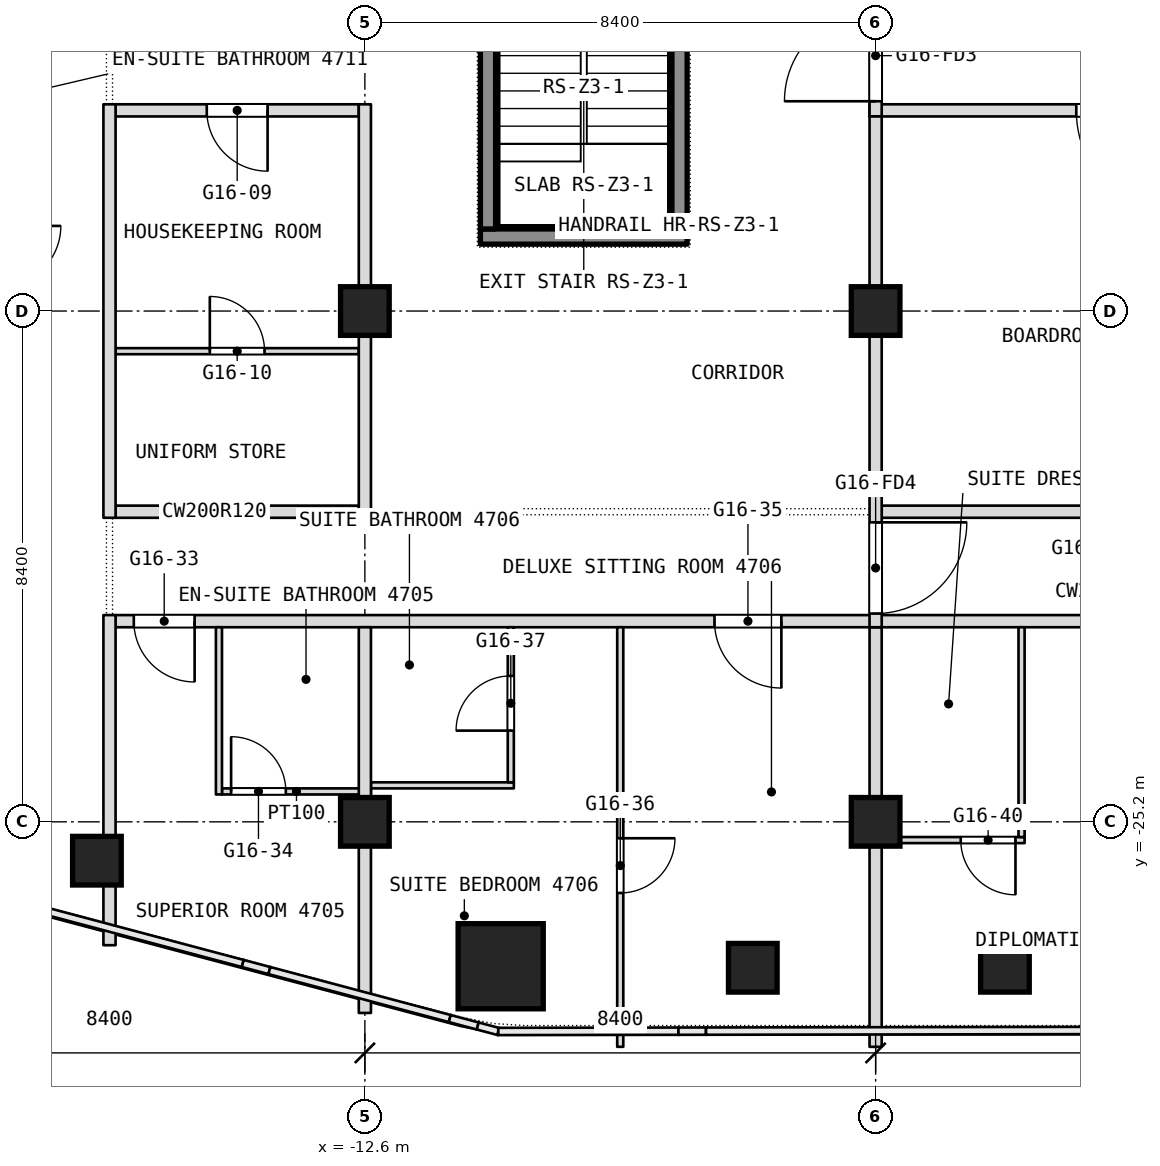
"""IFC4 building model, lengths in metres.
Left out: names, types, materials, properties, quantities, classifications, styles, units other than length and angle.
Written with IfcOpenShell. Run it as: python <this file> out.ifc"""

import sys

from ifc_helpers import new_model, si_unit, direction, frame, frame_2d, origin, origin_2d, place, context, subcontext, project, spatial, rectangle, extrude, element, fill, save


model = new_model("IFC4")
c1 = context("Model", 3, precision=1e-05, world=origin(), true_north=direction((0.0, 1.0)))
c2 = subcontext(c1, "Body", "Model", "MODEL_VIEW")
j1 = project(units=[si_unit("LENGTHUNIT", "METRE"), si_unit("PLANEANGLEUNIT", "RADIAN")], contexts=[c1])
p1 = place(None, origin())
s1 = spatial("IfcSite", under=j1, at=p1, CompositionType="ELEMENT")
p2 = place(p1, origin())
s2 = spatial("IfcBuilding", under=s1, at=p2, CompositionType="ELEMENT")
p3 = place(p2, frame((0.0, 0.0, 205.7)))
s3 = spatial("IfcBuildingStorey", under=s2, at=p3, CompositionType="ELEMENT", Elevation=205.7)
p4 = place(p3, frame((-10.366, -27.575, 0.0), z_axis=(0.0, 0.0, 1.0), x_axis=(1.0, 0.0, 0.0)))
e1 = element("IfcColumn", 1, at=p4, inside=s3, PredefinedType="COLUMN", context=c2, shape_type="SweptSolid", body=[
    extrude(rectangle(XDim=1.4, YDim=1.4, at=origin_2d()), origin(), (0.0, 0.0, 1.0), 3.6),
])
for number, where, z_axis, x_axis in (
    (2, (-12.6, -25.2, 0.0), (0.0, 0.0, 1.0), (1.0, 0.0, 0.0)),
    (3, (-12.6, -16.8, 0.0), (0.0, 0.0, 1.0), (1.0, 0.0, 0.0)),
    (4, (-4.2, -25.2, 0.0), (0.0, 0.0, 1.0), (1.0, 0.0, 0.0)),
    (5, (-4.2, -16.8, 0.0), (0.0, 0.0, 1.0), (1.0, 0.0, 0.0)),
    (6, (-2.073, -27.6, 0.0), (0.0, 0.0, 1.0), (1.0, 0.0, 0.0)),
    (7, (-6.22, -27.6, 0.0), (0.0, 0.0, 1.0), (1.0, 0.0, 0.0)),
    (8, (-17.007, -25.839, 0.0), (0.0, 0.0, 1.0), (1.0, 0.0, 0.0)),
):
    element("IfcColumn", number, at=place(p3, frame(where, z_axis=z_axis, x_axis=x_axis)), inside=s3, PredefinedType="COLUMN", context=c2, shape_type="SweptSolid", body=[
        extrude(rectangle(XDim=0.8, YDim=0.8, at=origin_2d()), origin(), (0.0, 0.0, 1.0), 3.6),
    ])
p5 = place(p3, frame((-4.1, -25.5, 0.0), z_axis=(0.0, 0.0, 1.0), x_axis=(1.0, 0.0, 0.0)))
e9 = element("IfcWall", 9, at=p5, inside=s3, PredefinedType="PARTITIONING", context=c2, shape_type="SweptSolid", body=[
    extrude(rectangle(XDim=2.35, YDim=0.1, at=frame_2d((1.175, 0.0))), origin(), (0.0, 0.0, 1.0), 3.34),
])
p6 = place(p5, frame((1.3, 0.0, 0.0)))
e10 = element("IfcOpeningElement", 10, at=p6, cuts=e9, PredefinedType="OPENING", context=c2, shape_type="SweptSolid", body=[
    extrude(rectangle(XDim=0.9, YDim=2.1, at=frame_2d((0.45, 1.05))), frame((0.0, 0.05, 0.0), z_axis=(0.0, -1.0, 0.0), x_axis=(1.0, 0.0, 0.0)), (0.0, 0.0, 1.0), 0.1),
])
p7 = place(p3, frame((-14.95, -24.7, 0.0), z_axis=(0.0, 0.0, 1.0), x_axis=(1.0, 0.0, 0.0)))
e11 = element("IfcWall", 11, at=p7, inside=s3, PredefinedType="PARTITIONING", context=c2, shape_type="SweptSolid", body=[
    extrude(rectangle(XDim=2.45, YDim=0.1, at=frame_2d((1.225, 0.0))), origin(), (0.0, 0.0, 1.0), 3.34),
])
p8 = place(p7, frame((0.15, 0.0, 0.0)))
e12 = element("IfcOpeningElement", 12, at=p8, cuts=e11, PredefinedType="OPENING", context=c2, shape_type="SweptSolid", body=[
    extrude(rectangle(XDim=0.9, YDim=2.1, at=frame_2d((0.45, 1.05))), frame((0.0, 0.05, 0.0), z_axis=(0.0, -1.0, 0.0), x_axis=(1.0, 0.0, 0.0)), (0.0, 0.0, 1.0), 0.1),
])
p9 = place(p3, frame((-12.5, -24.6, 0.0), z_axis=(0.0, 0.0, 1.0), x_axis=(1.0, 0.0, 0.0)))
e13 = element("IfcWall", 13, at=p9, inside=s3, PredefinedType="PARTITIONING", context=c2, shape_type="SweptSolid", body=[
    extrude(rectangle(XDim=2.35, YDim=0.1, at=frame_2d((1.175, 0.0))), origin(), (0.0, 0.0, 1.0), 3.34),
])
p10 = place(p3, frame((-16.7, -21.9, 0.0), z_axis=(0.0, 0.0, 1.0), x_axis=(1.0, 0.0, 0.0)))
e14 = element("IfcWall", 14, at=p10, inside=s3, PredefinedType="PARTITIONING", context=c2, shape_type="SweptSolid", body=[
    extrude(rectangle(XDim=33.4, YDim=0.2, at=frame_2d((16.7, 0.0))), origin(), (0.0, 0.0, 1.0), 3.34),
])
p11 = place(p10, frame((0.3, 0.0, 0.0)))
e15 = element("IfcOpeningElement", 15, at=p11, cuts=e14, PredefinedType="OPENING", context=c2, shape_type="SweptSolid", body=[
    extrude(rectangle(XDim=1.0, YDim=2.1, at=frame_2d((0.5, 1.05))), frame((0.0, 0.1, 0.0), z_axis=(0.0, -1.0, 0.0), x_axis=(1.0, 0.0, 0.0)), (0.0, 0.0, 1.0), 0.2),
])
p12 = place(p10, frame((9.85, 0.0, 0.0)))
e16 = element("IfcOpeningElement", 16, at=p12, cuts=e14, PredefinedType="OPENING", context=c2, shape_type="SweptSolid", body=[
    extrude(rectangle(XDim=1.1, YDim=2.1, at=frame_2d((0.55, 1.05))), frame((0.0, 0.1, 0.0), z_axis=(0.0, -1.0, 0.0), x_axis=(1.0, 0.0, 0.0)), (0.0, 0.0, 1.0), 0.2),
])
p13 = place(p10, frame((16.1, 0.0, 0.0)))
e17 = element("IfcOpeningElement", 17, at=p13, cuts=e14, PredefinedType="OPENING", context=c2, shape_type="SweptSolid", body=[
    extrude(rectangle(XDim=1.1, YDim=2.1, at=frame_2d((0.55, 1.05))), frame((0.0, 0.1, 0.0), z_axis=(0.0, -1.0, 0.0), x_axis=(1.0, 0.0, 0.0)), (0.0, 0.0, 1.0), 0.2),
])
p14 = place(p10, frame((24.6, 0.0, 0.0)))
e18 = element("IfcOpeningElement", 18, at=p14, cuts=e14, PredefinedType="OPENING", context=c2, shape_type="SweptSolid", body=[
    extrude(rectangle(XDim=1.1, YDim=2.1, at=frame_2d((0.55, 1.05))), frame((0.0, 0.1, 0.0), z_axis=(0.0, -1.0, 0.0), x_axis=(1.0, 0.0, 0.0)), (0.0, 0.0, 1.0), 0.2),
])
p15 = place(p10, frame((29.7, 0.0, 0.0)))
e19 = element("IfcOpeningElement", 19, at=p15, cuts=e14, PredefinedType="OPENING", context=c2, shape_type="SweptSolid", body=[
    extrude(rectangle(XDim=1.0, YDim=2.1, at=frame_2d((0.5, 1.05))), frame((0.0, 0.1, 0.0), z_axis=(0.0, -1.0, 0.0), x_axis=(1.0, 0.0, 0.0)), (0.0, 0.0, 1.0), 0.2),
])
p16 = place(p3, frame((-16.7, -20.1, 0.0), z_axis=(0.0, 0.0, 1.0), x_axis=(1.0, 0.0, 0.0)))
e20 = element("IfcWall", 20, at=p16, inside=s3, PredefinedType="PARTITIONING", context=c2, shape_type="SweptSolid", body=[
    extrude(rectangle(XDim=4.0, YDim=0.2, at=frame_2d((2.0, 0.0))), origin(), (0.0, 0.0, 1.0), 3.34),
])
p17 = place(p3, frame((-4.1, -20.1, 0.0), z_axis=(0.0, 0.0, 1.0), x_axis=(1.0, 0.0, 0.0)))
e21 = element("IfcWall", 21, at=p17, inside=s3, PredefinedType="PARTITIONING", context=c2, shape_type="SweptSolid", body=[
    extrude(rectangle(XDim=20.8, YDim=0.2, at=frame_2d((10.4, 0.0))), origin(), (0.0, 0.0, 1.0), 3.34),
])
p18 = place(p3, frame((-16.7, -17.46, 0.0), z_axis=(0.0, 0.0, 1.0), x_axis=(1.0, 0.0, 0.0)))
e22 = element("IfcWall", 22, at=p18, inside=s3, PredefinedType="PARTITIONING", context=c2, shape_type="SweptSolid", body=[
    extrude(rectangle(XDim=4.0, YDim=0.1, at=frame_2d((2.0, 0.0))), origin(), (0.0, 0.0, 1.0), 3.34),
])
p19 = place(p18, frame((1.55, 0.0, 0.0)))
e23 = element("IfcOpeningElement", 23, at=p19, cuts=e22, PredefinedType="OPENING", context=c2, shape_type="SweptSolid", body=[
    extrude(rectangle(XDim=0.9, YDim=2.1, at=frame_2d((0.45, 1.05))), frame((0.0, 0.05, 0.0), z_axis=(0.0, -1.0, 0.0), x_axis=(1.0, 0.0, 0.0)), (0.0, 0.0, 1.0), 0.1),
])
p20 = place(p3, frame((-16.7, -13.5, 0.0), z_axis=(0.0, 0.0, 1.0), x_axis=(1.0, 0.0, 0.0)))
e24 = element("IfcWall", 24, at=p20, inside=s3, PredefinedType="PARTITIONING", context=c2, shape_type="SweptSolid", body=[
    extrude(rectangle(XDim=4.0, YDim=0.2, at=frame_2d((2.0, 0.0))), origin(), (0.0, 0.0, 1.0), 3.34),
])
p21 = place(p20, frame((1.5, 0.0, 0.0)))
e25 = element("IfcOpeningElement", 25, at=p21, cuts=e24, PredefinedType="OPENING", context=c2, shape_type="SweptSolid", body=[
    extrude(rectangle(XDim=1.0, YDim=2.1, at=frame_2d((0.5, 1.05))), frame((0.0, 0.1, 0.0), z_axis=(0.0, -1.0, 0.0), x_axis=(1.0, 0.0, 0.0)), (0.0, 0.0, 1.0), 0.2),
])
p22 = place(p3, frame((-4.3, -13.5, 0.0), z_axis=(0.0, 0.0, 1.0), x_axis=(1.0, 0.0, 0.0)))
e26 = element("IfcWall", 26, at=p22, inside=s3, PredefinedType="PARTITIONING", context=c2, shape_type="SweptSolid", body=[
    extrude(rectangle(XDim=10.0, YDim=0.2, at=frame_2d((5.0, 0.0))), origin(), (0.0, 0.0, 1.0), 3.34),
])
p23 = place(p22, frame((3.4, 0.0, 0.0)))
e27 = element("IfcOpeningElement", 27, at=p23, cuts=e26, PredefinedType="OPENING", context=c2, shape_type="SweptSolid", body=[
    extrude(rectangle(XDim=1.8, YDim=2.1, at=frame_2d((0.9, 1.05))), frame((0.0, 0.1, 0.0), z_axis=(0.0, -1.0, 0.0), x_axis=(1.0, 0.0, 0.0)), (0.0, 0.0, 1.0), 0.2),
])
p24 = place(p22, frame((8.85, 0.0, 0.0)))
e28 = element("IfcOpeningElement", 28, at=p24, cuts=e26, PredefinedType="OPENING", context=c2, shape_type="SweptSolid", body=[
    extrude(rectangle(XDim=1.0, YDim=2.1, at=frame_2d((0.5, 1.05))), frame((0.0, 0.1, 0.0), z_axis=(0.0, -1.0, 0.0), x_axis=(1.0, 0.0, 0.0)), (0.0, 0.0, 1.0), 0.2),
])
p25 = place(p3, frame((-1.8, -25.45, 0.0), z_axis=(0.0, 0.0, 1.0), x_axis=(0.0, 1.0, 0.0)))
e29 = element("IfcWall", 29, at=p25, inside=s3, PredefinedType="PARTITIONING", context=c2, shape_type="SweptSolid", body=[
    extrude(rectangle(XDim=3.45, YDim=0.1, at=frame_2d((1.725, 0.0))), origin(), (0.0, 0.0, 1.0), 3.34),
])
p26 = place(p3, frame((-4.2, -28.9, 0.0), z_axis=(0.0, 0.0, 1.0), x_axis=(0.0, 1.0, 0.0)))
e30 = element("IfcWall", 30, at=p26, inside=s3, PredefinedType="PARTITIONING", context=c2, shape_type="SweptSolid", body=[
    extrude(rectangle(XDim=6.9, YDim=0.2, at=frame_2d((3.45, 0.0))), origin(), (0.0, 0.0, 1.0), 3.34),
])
p27 = place(p3, frame((-4.2, -13.6, 0.0), z_axis=(0.0, 0.0, 1.0), x_axis=(0.0, 1.0, 0.0)))
e31 = element("IfcWall", 31, at=p27, inside=s3, PredefinedType="PARTITIONING", context=c2, shape_type="SweptSolid", body=[
    extrude(rectangle(XDim=13.6, YDim=0.2, at=frame_2d((6.8, 0.0))), origin(), (0.0, 0.0, 1.0), 3.34),
])
p28 = place(p27, frame((11.95, 0.0, 0.0)))
e32 = element("IfcOpeningElement", 32, at=p28, cuts=e31, PredefinedType="OPENING", context=c2, shape_type="SweptSolid", body=[
    extrude(rectangle(XDim=1.5, YDim=2.1, at=frame_2d((0.75, 1.05))), frame((0.0, 0.1, 0.0), z_axis=(0.0, -1.0, 0.0), x_axis=(1.0, 0.0, 0.0)), (0.0, 0.0, 1.0), 0.2),
])
p29 = place(p27, frame((0.25, 0.0, 0.0)))
e33 = element("IfcOpeningElement", 33, at=p29, cuts=e31, PredefinedType="OPENING", context=c2, shape_type="SweptSolid", body=[
    extrude(rectangle(XDim=1.5, YDim=2.1, at=frame_2d((0.75, 1.05))), frame((0.0, 0.1, 0.0), z_axis=(0.0, -1.0, 0.0), x_axis=(1.0, 0.0, 0.0)), (0.0, 0.0, 1.0), 0.2),
])
p30 = place(p3, frame((-4.2, -22.0, 0.0), z_axis=(0.0, 0.0, 1.0), x_axis=(0.0, 1.0, 0.0)))
e34 = element("IfcWall", 34, at=p30, inside=s3, PredefinedType="PARTITIONING", context=c2, shape_type="SweptSolid", body=[
    extrude(rectangle(XDim=8.4, YDim=0.2, at=frame_2d((4.2, 0.0))), origin(), (0.0, 0.0, 1.0), 3.34),
])
p31 = place(p30, frame((0.225, 0.0, 0.0)))
e35 = element("IfcOpeningElement", 35, at=p31, cuts=e34, PredefinedType="OPENING", context=c2, shape_type="SweptSolid", body=[
    extrude(rectangle(XDim=1.5, YDim=2.1, at=frame_2d((0.75, 1.05))), frame((0.0, 0.1, 0.0), z_axis=(0.0, -1.0, 0.0), x_axis=(1.0, 0.0, 0.0)), (0.0, 0.0, 1.0), 0.2),
])
p32 = place(p3, frame((-8.4, -28.9, 0.0), z_axis=(0.0, 0.0, 1.0), x_axis=(0.0, 1.0, 0.0)))
e36 = element("IfcWall", 36, at=p32, inside=s3, PredefinedType="PARTITIONING", context=c2, shape_type="SweptSolid", body=[
    extrude(rectangle(XDim=6.9, YDim=0.1, at=frame_2d((3.45, 0.0))), origin(), (0.0, 0.0, 1.0), 3.34),
])
p33 = place(p32, frame((2.53, 0.0, 0.0)))
e37 = element("IfcOpeningElement", 37, at=p33, cuts=e36, PredefinedType="OPENING", context=c2, shape_type="SweptSolid", body=[
    extrude(rectangle(XDim=0.9, YDim=2.1, at=frame_2d((0.45, 1.05))), frame((0.0, 0.05, 0.0), z_axis=(0.0, -1.0, 0.0), x_axis=(1.0, 0.0, 0.0)), (0.0, 0.0, 1.0), 0.1),
])
p34 = place(p3, frame((-10.2, -24.55, 0.0), z_axis=(0.0, 0.0, 1.0), x_axis=(0.0, 1.0, 0.0)))
e38 = element("IfcWall", 38, at=p34, inside=s3, PredefinedType="PARTITIONING", context=c2, shape_type="SweptSolid", body=[
    extrude(rectangle(XDim=2.55, YDim=0.1, at=frame_2d((1.275, 0.0))), origin(), (0.0, 0.0, 1.0), 3.34),
])
p35 = place(p34, frame((0.85, 0.0, 0.0)))
e39 = element("IfcOpeningElement", 39, at=p35, cuts=e38, PredefinedType="OPENING", context=c2, shape_type="SweptSolid", body=[
    extrude(rectangle(XDim=0.9, YDim=2.1, at=frame_2d((0.45, 1.05))), frame((0.0, 0.05, 0.0), z_axis=(0.0, -1.0, 0.0), x_axis=(1.0, 0.0, 0.0)), (0.0, 0.0, 1.0), 0.1),
])
p36 = place(p3, frame((-12.6, -28.343, 0.0), z_axis=(0.0, 0.0, 1.0), x_axis=(0.0, 1.0, 0.0)))
e40 = element("IfcWall", 40, at=p36, inside=s3, PredefinedType="PARTITIONING", context=c2, shape_type="SweptSolid", body=[
    extrude(rectangle(XDim=6.343, YDim=0.2, at=frame_2d((3.171, 0.0))), origin(), (0.0, 0.0, 1.0), 3.34),
])
p37 = place(p3, frame((-12.6, -20.2, 0.0), z_axis=(0.0, 0.0, 1.0), x_axis=(0.0, 1.0, 0.0)))
e41 = element("IfcWall", 41, at=p37, inside=s3, PredefinedType="PARTITIONING", context=c2, shape_type="SweptSolid", body=[
    extrude(rectangle(XDim=6.8, YDim=0.2, at=frame_2d((3.4, 0.0))), origin(), (0.0, 0.0, 1.0), 3.34),
])
p38 = place(p3, frame((-15.0, -24.75, 0.0), z_axis=(0.0, 0.0, 1.0), x_axis=(0.0, 1.0, 0.0)))
e42 = element("IfcWall", 42, at=p38, inside=s3, PredefinedType="PARTITIONING", context=c2, shape_type="SweptSolid", body=[
    extrude(rectangle(XDim=2.75, YDim=0.1, at=frame_2d((1.375, 0.0))), origin(), (0.0, 0.0, 1.0), 3.34),
])
p39 = place(p3, frame((-16.8, -27.229, 0.0), z_axis=(0.0, 0.0, 1.0), x_axis=(0.0, 1.0, 0.0)))
e43 = element("IfcWall", 43, at=p39, inside=s3, PredefinedType="PARTITIONING", context=c2, shape_type="SweptSolid", body=[
    extrude(rectangle(XDim=5.429, YDim=0.2, at=frame_2d((2.714, 0.0))), origin(), (0.0, 0.0, 1.0), 3.34),
])
p40 = place(p3, frame((-16.8, -20.2, 0.0), z_axis=(0.0, 0.0, 1.0), x_axis=(0.0, 1.0, 0.0)))
e44 = element("IfcWall", 44, at=p40, inside=s3, PredefinedType="PARTITIONING", context=c2, shape_type="SweptSolid", body=[
    extrude(rectangle(XDim=6.8, YDim=0.2, at=frame_2d((3.4, 0.0))), origin(), (0.0, 0.0, 1.0), 3.34),
])
p41 = place(p3, frame((-10.7, -15.575, 0.1), z_axis=(0.0, 0.0, 1.0), x_axis=(1.0, 0.0, 0.0)))
e45 = element("IfcWall", 45, at=p41, inside=s3, PredefinedType="SHEAR", context=c2, shape_type="SweptSolid", body=[
    extrude(rectangle(XDim=3.4, YDim=0.25, at=frame_2d((1.7, 0.0))), origin(), (0.0, 0.0, 1.0), 3.6),
])
for number, where, z_axis, x_axis in (
    (46, (-10.575, -15.45, 0.1), (0.0, 0.0, 1.0), (0.0, 1.0, 0.0)),
    (47, (-7.425, -15.45, 0.1), (0.0, 0.0, 1.0), (0.0, 1.0, 0.0)),
):
    element("IfcWall", number, at=place(p3, frame(where, z_axis=z_axis, x_axis=x_axis)), inside=s3, PredefinedType="SHEAR", context=c2, shape_type="SweptSolid", body=[
        extrude(rectangle(XDim=5.7, YDim=0.25, at=frame_2d((2.85, 0.0))), origin(), (0.0, 0.0, 1.0), 3.6),
    ])
p42 = place(p6, origin())
e48 = element("IfcDoor", 48, at=p42, inside=s3, OperationType="SINGLE_SWING_RIGHT", PredefinedType="DOOR", context=c2, shape_type="SweptSolid", body=[
    extrude(rectangle(XDim=0.9, YDim=2.1, at=frame_2d((0.45, 1.05))), frame((0.0, 0.025, 0.0), z_axis=(0.0, -1.0, 0.0), x_axis=(1.0, 0.0, 0.0)), (0.0, 0.0, 1.0), 0.05),
])
fill(e10, e48)
p43 = place(p8, origin())
e49 = element("IfcDoor", 49, at=p43, inside=s3, OperationType="SINGLE_SWING_LEFT", PredefinedType="DOOR", context=c2, shape_type="SweptSolid", body=[
    extrude(rectangle(XDim=0.9, YDim=2.1, at=frame_2d((0.45, 1.05))), frame((0.0, 0.025, 0.0), z_axis=(0.0, -1.0, 0.0), x_axis=(1.0, 0.0, 0.0)), (0.0, 0.0, 1.0), 0.05),
])
fill(e12, e49)
p44 = place(p11, origin())
e50 = element("IfcDoor", 50, at=p44, inside=s3, OperationType="SINGLE_SWING_RIGHT", PredefinedType="DOOR", context=c2, shape_type="SweptSolid", body=[
    extrude(rectangle(XDim=1.0, YDim=2.1, at=frame_2d((0.5, 1.05))), frame((0.0, 0.025, 0.0), z_axis=(0.0, -1.0, 0.0), x_axis=(1.0, 0.0, 0.0)), (0.0, 0.0, 1.0), 0.05),
])
fill(e15, e50)
p45 = place(p12, origin())
e51 = element("IfcDoor", 51, at=p45, inside=s3, OperationType="SINGLE_SWING_LEFT", PredefinedType="DOOR", context=c2, shape_type="SweptSolid", body=[
    extrude(rectangle(XDim=1.1, YDim=2.1, at=frame_2d((0.55, 1.05))), frame((0.0, 0.025, 0.0), z_axis=(0.0, -1.0, 0.0), x_axis=(1.0, 0.0, 0.0)), (0.0, 0.0, 1.0), 0.05),
])
fill(e16, e51)
p46 = place(p19, origin())
e52 = element("IfcDoor", 52, at=p46, inside=s3, OperationType="SINGLE_SWING_LEFT", PredefinedType="DOOR", context=c2, shape_type="SweptSolid", body=[
    extrude(rectangle(XDim=0.9, YDim=2.1, at=frame_2d((0.45, 1.05))), frame((0.0, 0.025, 0.0), z_axis=(0.0, -1.0, 0.0), x_axis=(1.0, 0.0, 0.0)), (0.0, 0.0, 1.0), 0.05),
])
fill(e23, e52)
p47 = place(p21, origin())
e53 = element("IfcDoor", 53, at=p47, inside=s3, OperationType="SINGLE_SWING_LEFT", PredefinedType="DOOR", context=c2, shape_type="SweptSolid", body=[
    extrude(rectangle(XDim=1.0, YDim=2.1, at=frame_2d((0.5, 1.05))), frame((0.0, 0.025, 0.0), z_axis=(0.0, -1.0, 0.0), x_axis=(1.0, 0.0, 0.0)), (0.0, 0.0, 1.0), 0.05),
])
fill(e25, e53)
p48 = place(p23, origin())
e54 = element("IfcDoor", 54, at=p48, inside=s3, OperationType="DOUBLE_DOOR_SINGLE_SWING", PredefinedType="DOOR", context=c2, shape_type="SweptSolid", body=[
    extrude(rectangle(XDim=1.8, YDim=2.1, at=frame_2d((0.9, 1.05))), frame((0.0, 0.025, 0.0), z_axis=(0.0, -1.0, 0.0), x_axis=(1.0, 0.0, 0.0)), (0.0, 0.0, 1.0), 0.05),
])
fill(e27, e54)
p49 = place(p33, origin())
e55 = element("IfcDoor", 55, at=p49, inside=s3, OperationType="SINGLE_SWING_LEFT", PredefinedType="DOOR", context=c2, shape_type="SweptSolid", body=[
    extrude(rectangle(XDim=0.9, YDim=2.1, at=frame_2d((0.45, 1.05))), frame((0.0, 0.025, 0.0), z_axis=(0.0, -1.0, 0.0), x_axis=(1.0, 0.0, 0.0)), (0.0, 0.0, 1.0), 0.05),
])
fill(e37, e55)
p50 = place(p35, origin())
e56 = element("IfcDoor", 56, at=p50, inside=s3, OperationType="SINGLE_SWING_RIGHT", PredefinedType="DOOR", context=c2, shape_type="SweptSolid", body=[
    extrude(rectangle(XDim=0.9, YDim=2.1, at=frame_2d((0.45, 1.05))), frame((0.0, 0.025, 0.0), z_axis=(0.0, -1.0, 0.0), x_axis=(1.0, 0.0, 0.0)), (0.0, 0.0, 1.0), 0.05),
])
fill(e39, e56)
p51 = place(p29, origin())
e57 = element("IfcDoor", 57, at=p51, inside=s3, OperationType="DOUBLE_DOOR_DOUBLE_SWING", PredefinedType="DOOR", context=c2, shape_type="SweptSolid", body=[
    extrude(rectangle(XDim=1.5, YDim=2.1, at=frame_2d((0.75, 1.05))), frame((0.0, 0.025, 0.0), z_axis=(0.0, -1.0, 0.0), x_axis=(1.0, 0.0, 0.0)), (0.0, 0.0, 1.0), 0.05),
])
fill(e33, e57)
p52 = place(p31, origin())
e58 = element("IfcDoor", 58, at=p52, inside=s3, OperationType="DOUBLE_DOOR_DOUBLE_SWING", PredefinedType="DOOR", context=c2, shape_type="SweptSolid", body=[
    extrude(rectangle(XDim=1.5, YDim=2.1, at=frame_2d((0.75, 1.05))), frame((0.0, 0.025, 0.0), z_axis=(0.0, -1.0, 0.0), x_axis=(1.0, 0.0, 0.0)), (0.0, 0.0, 1.0), 0.05),
])
fill(e35, e58)
save(model, sys.argv[1])
